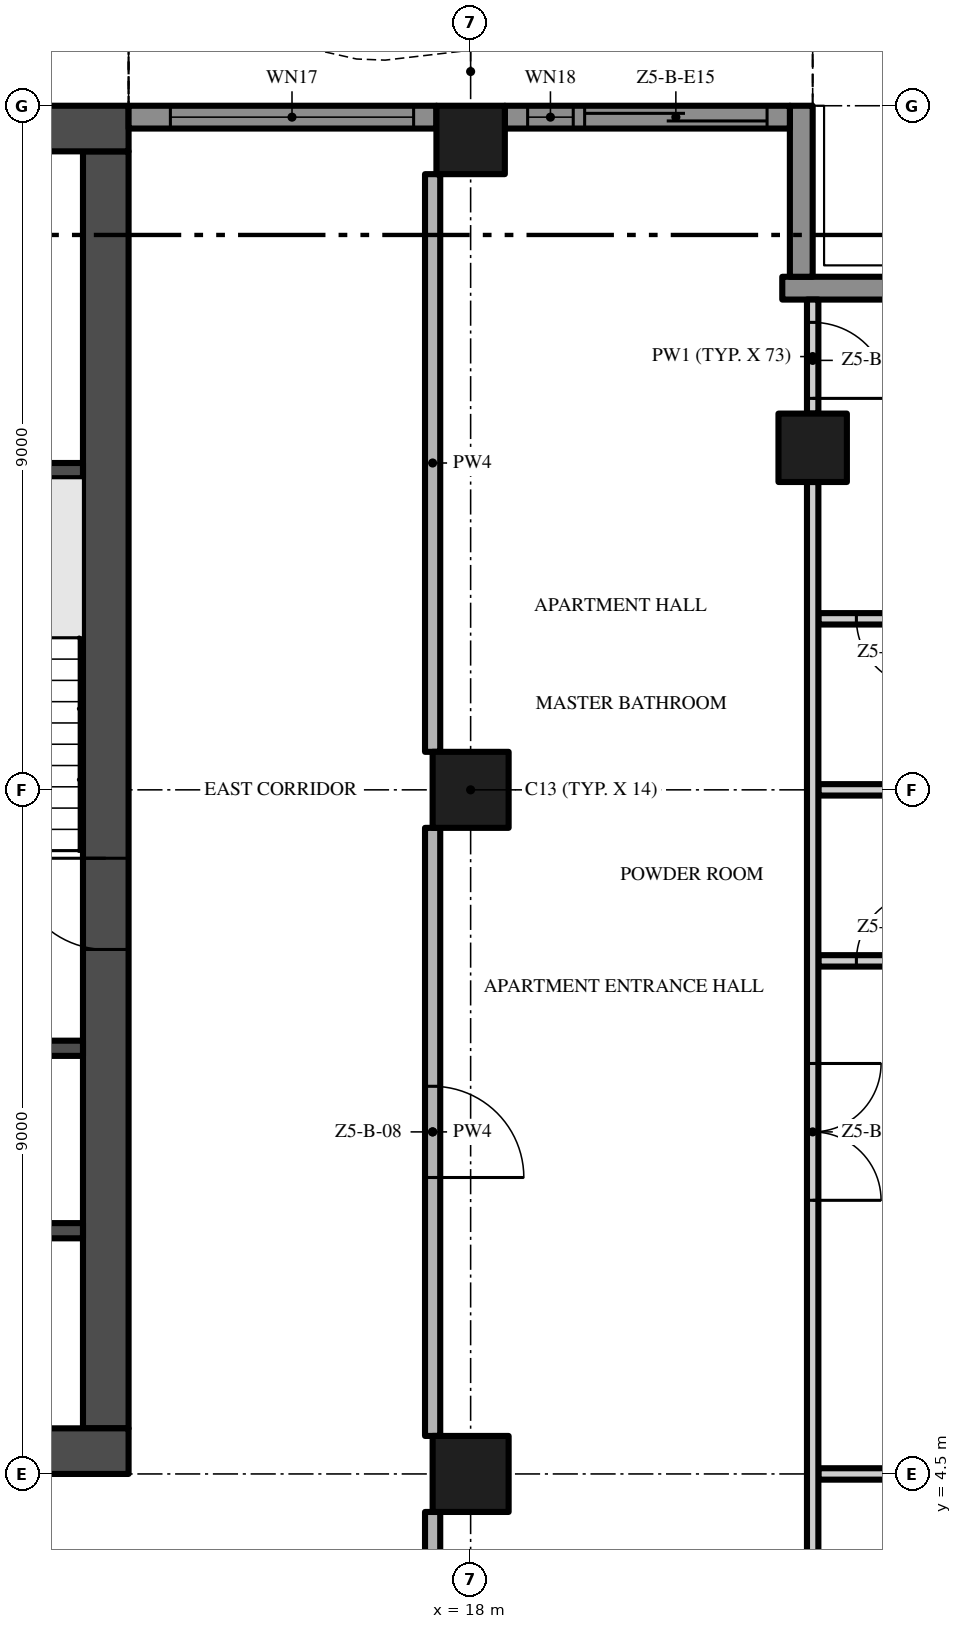
"""IFC4 building model, lengths in metres.
Left out: names, types, materials, properties, quantities, classifications, styles, units other than length and angle.
Written with IfcOpenShell. Run it as: python <this file> out.ifc"""

import sys

from ifc_helpers import new_model, si_unit, direction, frame, frame_2d, origin, origin_2d, place, context, subcontext, project, spatial, polyline, rectangle, outline, extrude, element, fill, save


model = new_model("IFC4")
c1 = context("Model", 3, precision=1e-05, world=origin(), true_north=direction((0.0, 1.0)))
c2 = subcontext(c1, "Body", "Model", "MODEL_VIEW")
j1 = project(units=[si_unit("LENGTHUNIT", "METRE"), si_unit("PLANEANGLEUNIT", "RADIAN")], contexts=[c1])
p1 = place(None, origin())
s1 = spatial("IfcSite", under=j1, at=p1, CompositionType="ELEMENT")
p2 = place(p1, origin())
s2 = spatial("IfcBuilding", under=s1, at=p2, CompositionType="ELEMENT")
p3 = place(p2, frame((0.0, 0.0, 254.0)))
s3 = spatial("IfcBuildingStorey", under=s2, at=p3, CompositionType="ELEMENT", Elevation=254.0)
p4 = place(p3, frame((-13.5, 4.8, -0.3), z_axis=(0.0, 0.0, 1.0), x_axis=(1.0, 0.0, 0.0)))
e1 = element("IfcWall", 1, at=p4, inside=s3, PredefinedType="SHEAR", context=c2, shape_type="SweptSolid", body=[
    extrude(rectangle(XDim=27.0, YDim=0.6, at=frame_2d((13.5, 0.0))), origin(), (0.0, 0.0, 1.0), 3.8),
])
p5 = place(p4, frame((12.0, 0.0, 0.3)))
e2 = element("IfcOpeningElement", 2, at=p5, cuts=e1, PredefinedType="OPENING", context=c2, shape_type="SweptSolid", body=[
    extrude(rectangle(XDim=3.0, YDim=2.4, at=frame_2d((1.5, 1.2))), frame((0.0, 0.31, 0.0), z_axis=(0.0, -1.0, 0.0), x_axis=(1.0, 0.0, 0.0)), (0.0, 0.0, 1.0), 0.62),
])
p6 = place(p4, frame((4.9, 0.0, 0.3)))
e3 = element("IfcOpeningElement", 3, at=p6, cuts=e1, PredefinedType="OPENING", context=c2, shape_type="SweptSolid", body=[
    extrude(rectangle(XDim=1.2, YDim=2.2, at=frame_2d((0.6, 1.1))), frame((0.0, 0.31, 0.0), z_axis=(0.0, -1.0, 0.0), x_axis=(1.0, 0.0, 0.0)), (0.0, 0.0, 1.0), 0.62),
])
p7 = place(p4, frame((20.75, 0.0, 0.3)))
e4 = element("IfcOpeningElement", 4, at=p7, cuts=e1, PredefinedType="OPENING", context=c2, shape_type="SweptSolid", body=[
    extrude(rectangle(XDim=1.5, YDim=2.2, at=frame_2d((0.75, 1.1))), frame((0.0, 0.31, 0.0), z_axis=(0.0, -1.0, 0.0), x_axis=(1.0, 0.0, 0.0)), (0.0, 0.0, 1.0), 0.62),
])
p8 = place(p4, frame((17.4, 0.0, 0.3)))
e5 = element("IfcOpeningElement", 5, at=p8, cuts=e1, PredefinedType="OPENING", context=c2, shape_type="SweptSolid", body=[
    extrude(rectangle(XDim=1.2, YDim=2.2, at=frame_2d((0.6, 1.1))), frame((0.0, 0.31, 0.0), z_axis=(0.0, -1.0, 0.0), x_axis=(1.0, 0.0, 0.0)), (0.0, 0.0, 1.0), 0.62),
])
p9 = place(p3, frame((13.2, 5.1, -0.3), z_axis=(0.0, 0.0, 1.0), x_axis=(0.0, 1.0, 0.0)))
e6 = element("IfcWall", 6, at=p9, inside=s3, PredefinedType="SHEAR", context=c2, shape_type="SweptSolid", body=[
    extrude(rectangle(XDim=16.8, YDim=0.6, at=frame_2d((8.4, 0.0))), origin(), (0.0, 0.0, 1.0), 3.8),
])
p10 = place(p9, frame((6.3, 0.0, 0.3)))
e7 = element("IfcOpeningElement", 7, at=p10, cuts=e6, PredefinedType="OPENING", context=c2, shape_type="SweptSolid", body=[
    extrude(rectangle(XDim=1.2, YDim=2.2, at=frame_2d((0.6, 1.1))), frame((0.0, 0.31, 0.0), z_axis=(0.0, -1.0, 0.0), x_axis=(1.0, 0.0, 0.0)), (0.0, 0.0, 1.0), 0.62),
])
p11 = place(p3, frame((13.5, 22.2, -0.3), z_axis=(0.0, 0.0, 1.0), x_axis=(-1.0, 0.0, 0.0)))
e8 = element("IfcWall", 8, at=p11, inside=s3, PredefinedType="SHEAR", context=c2, shape_type="SweptSolid", body=[
    extrude(rectangle(XDim=27.0, YDim=0.6, at=frame_2d((13.5, 0.0))), origin(), (0.0, 0.0, 1.0), 3.8),
])
p12 = place(p3, frame((18.0, 13.5, 0.0), z_axis=(0.0, 0.0, 1.0), x_axis=(1.0, 0.0, 0.0)))
e9 = element("IfcColumn", 9, at=p12, inside=s3, PredefinedType="COLUMN", context=c2, shape_type="SweptSolid", body=[
    extrude(rectangle(XDim=1.0, YDim=1.0, at=origin_2d()), origin(), (0.0, 0.0, 1.0), 3.5),
])
p13 = place(p3, frame((18.0, 22.05, 0.0), z_axis=(0.0, 0.0, 1.0), x_axis=(1.0, 0.0, 0.0)))
e10 = element("IfcColumn", 10, at=p13, inside=s3, PredefinedType="COLUMN", context=c2, shape_type="SweptSolid", body=[
    extrude(rectangle(XDim=0.9, YDim=0.9, at=origin_2d()), origin(), (0.0, 0.0, 1.0), 3.5),
])
p14 = place(p3, frame((18.0, 4.5, 0.0), z_axis=(0.0, 0.0, 1.0), x_axis=(1.0, 0.0, 0.0)))
e11 = element("IfcColumn", 11, at=p14, inside=s3, PredefinedType="COLUMN", context=c2, shape_type="SweptSolid", body=[
    extrude(rectangle(XDim=1.0, YDim=1.0, at=origin_2d()), origin(), (0.0, 0.0, 1.0), 3.5),
])
p15 = place(p3, frame((22.5, 18.0, 0.0), z_axis=(0.0, 0.0, 1.0), x_axis=(1.0, 0.0, 0.0)))
e12 = element("IfcColumn", 12, at=p15, inside=s3, PredefinedType="COLUMN", context=c2, shape_type="SweptSolid", body=[
    extrude(rectangle(XDim=0.9, YDim=0.9, at=origin_2d()), origin(), (0.0, 0.0, 1.0), 3.5),
])
p16 = place(p3, frame((22.1, 20.1, 0.0), z_axis=(0.0, 0.0, 1.0), x_axis=(1.0, 0.0, 0.0)))
e13 = element("IfcWall", 13, at=p16, inside=s3, PredefinedType="SOLIDWALL", context=c2, shape_type="SweptSolid", body=[
    extrude(rectangle(XDim=2.35, YDim=0.3, at=frame_2d((1.175, 0.0))), origin(), (0.0, 0.0, 1.0), 3.5),
])
p17 = place(p3, frame((22.35, 22.5, 0.0), z_axis=(0.0, 0.0, 1.0), x_axis=(0.0, -1.0, 0.0)))
e14 = element("IfcWall", 14, at=p17, inside=s3, PredefinedType="SOLIDWALL", context=c2, shape_type="SweptSolid", body=[
    extrude(rectangle(XDim=2.25, YDim=0.3, at=frame_2d((1.125, 0.0))), origin(), (0.0, 0.0, 1.0), 3.5),
])
p18 = place(p3, frame((18.45, 22.35, 0.0), z_axis=(0.0, 0.0, 1.0), x_axis=(1.0, 0.0, 0.0)))
e15 = element("IfcWall", 15, at=p18, inside=s3, PredefinedType="SOLIDWALL", context=c2, shape_type="SweptSolid", body=[
    extrude(rectangle(XDim=3.75, YDim=0.3, at=frame_2d((1.875, 0.0))), origin(), (0.0, 0.0, 1.0), 3.5),
])
p19 = place(p18, frame((1.05, 0.0, 0.0)))
e16 = element("IfcOpeningElement", 16, at=p19, cuts=e15, PredefinedType="OPENING", context=c2, shape_type="SweptSolid", body=[
    extrude(rectangle(XDim=2.4, YDim=2.4, at=frame_2d((1.2, 1.2))), frame((0.0, 0.16, 0.0), z_axis=(0.0, -1.0, 0.0), x_axis=(1.0, 0.0, 0.0)), (0.0, 0.0, 1.0), 0.32),
])
p20 = place(p18, frame((0.3, 0.0, 0.45)))
e17 = element("IfcOpeningElement", 17, at=p20, cuts=e15, PredefinedType="OPENING", context=c2, shape_type="SweptSolid", body=[
    extrude(rectangle(XDim=0.6, YDim=2.65, at=frame_2d((0.3, 1.325))), frame((0.0, 0.16, 0.0), z_axis=(0.0, -1.0, 0.0), x_axis=(1.0, 0.0, 0.0)), (0.0, 0.0, 1.0), 0.32),
])
p21 = place(p3, frame((13.5, 22.35, 0.0), z_axis=(0.0, 0.0, 1.0), x_axis=(1.0, 0.0, 0.0)))
e18 = element("IfcWall", 18, at=p21, inside=s3, PredefinedType="SOLIDWALL", context=c2, shape_type="SweptSolid", body=[
    extrude(rectangle(XDim=4.05, YDim=0.3, at=frame_2d((2.025, 0.0))), origin(), (0.0, 0.0, 1.0), 3.5),
])
p22 = place(p21, frame((0.55, 0.0, 0.45)))
e19 = element("IfcOpeningElement", 19, at=p22, cuts=e18, PredefinedType="OPENING", context=c2, shape_type="SweptSolid", body=[
    extrude(rectangle(XDim=3.2, YDim=2.65, at=frame_2d((1.6, 1.325))), frame((0.0, 0.16, 0.0), z_axis=(0.0, -1.0, 0.0), x_axis=(1.0, 0.0, 0.0)), (0.0, 0.0, 1.0), 0.32),
])
p23 = place(p3, origin())
e20 = element("IfcWall", 20, at=p23, inside=s3, PredefinedType="USERDEFINED", context=c2, shape_type="SweptSolid", body=[
    extrude(outline(polyline([(22.5, 25.149), (21.0, 24.488), (19.5, 23.755), (18.0, 23.231), (16.875, 23.1), (16.5, 23.115), (15.0, 23.451), (13.5, 24.112), (13.399, 23.883), (14.921, 23.213), (16.467, 22.866), (16.885, 22.849), (18.056, 22.986), (19.596, 23.524), (21.105, 24.261), (22.601, 24.92), (22.5, 25.149)])), origin(), (0.0, 0.0, 1.0), 0.9),
])
for number, where, z_axis, x_axis in (
    (21, (9.65, 7.7, 0.0), (0.0, 0.0, 1.0), (1.0, 0.0, 0.0)),
    (22, (9.65, 10.1, 0.0), (0.0, 0.0, 1.0), (1.0, 0.0, 0.0)),
    (23, (9.65, 17.7, 0.0), (0.0, 0.0, 1.0), (1.0, 0.0, 0.0)),
):
    element("IfcWall", number, at=place(p3, frame(where, z_axis=z_axis, x_axis=x_axis)), inside=s3, PredefinedType="SHEAR", context=c2, shape_type="SweptSolid", body=[
        extrude(rectangle(XDim=3.25, YDim=0.2, at=frame_2d((1.625, 0.0))), origin(), (0.0, 0.0, 1.0), 3.5),
    ])
p24 = place(p3, frame((22.575, 4.5, 0.0), z_axis=(0.0, 0.0, 1.0), x_axis=(1.0, 0.0, 0.0)))
e24 = element("IfcWall", 24, at=p24, inside=s3, PredefinedType="PARTITIONING", context=c2, shape_type="SweptSolid", body=[
    extrude(rectangle(XDim=3.525, YDim=0.15, at=frame_2d((1.762, 0.0))), origin(), (0.0, 0.0, 1.0), 3.5),
])
p25 = place(p3, frame((22.575, 11.25, 0.0), z_axis=(0.0, 0.0, 1.0), x_axis=(1.0, 0.0, 0.0)))
e25 = element("IfcWall", 25, at=p25, inside=s3, PredefinedType="PARTITIONING", context=c2, shape_type="SweptSolid", body=[
    extrude(rectangle(XDim=1.875, YDim=0.15, at=frame_2d((0.938, 0.0))), origin(), (0.0, 0.0, 1.0), 3.5),
])
p26 = place(p25, frame((0.5, 0.0, 0.0)))
e26 = element("IfcOpeningElement", 26, at=p26, cuts=e25, PredefinedType="OPENING", context=c2, shape_type="SweptSolid", body=[
    extrude(rectangle(XDim=0.9, YDim=2.1, at=frame_2d((0.45, 1.05))), frame((0.0, 0.085, 0.0), z_axis=(0.0, -1.0, 0.0), x_axis=(1.0, 0.0, 0.0)), (0.0, 0.0, 1.0), 0.17),
])
p27 = place(p3, frame((22.575, 13.5, 0.0), z_axis=(0.0, 0.0, 1.0), x_axis=(1.0, 0.0, 0.0)))
e27 = element("IfcWall", 27, at=p27, inside=s3, PredefinedType="PARTITIONING", context=c2, shape_type="SweptSolid", body=[
    extrude(rectangle(XDim=1.875, YDim=0.15, at=frame_2d((0.938, 0.0))), origin(), (0.0, 0.0, 1.0), 3.5),
])
p28 = place(p3, frame((24.45, 15.75, 0.0), z_axis=(0.0, 0.0, 1.0), x_axis=(-1.0, 0.0, 0.0)))
e28 = element("IfcWall", 28, at=p28, inside=s3, PredefinedType="PARTITIONING", context=c2, shape_type="SweptSolid", body=[
    extrude(rectangle(XDim=1.875, YDim=0.15, at=frame_2d((0.938, 0.0))), origin(), (0.0, 0.0, 1.0), 3.5),
])
p29 = place(p28, frame((0.475, 0.0, 0.0)))
e29 = element("IfcOpeningElement", 29, at=p29, cuts=e28, PredefinedType="OPENING", context=c2, shape_type="SweptSolid", body=[
    extrude(rectangle(XDim=0.9, YDim=2.1, at=frame_2d((0.45, 1.05))), frame((0.0, 0.085, 0.0), z_axis=(0.0, -1.0, 0.0), x_axis=(1.0, 0.0, 0.0)), (0.0, 0.0, 1.0), 0.17),
])
p30 = place(p3, frame((17.5, -0.2, 0.0), z_axis=(0.0, 0.0, 1.0), x_axis=(0.0, 1.0, 0.0)))
e30 = element("IfcWall", 30, at=p30, inside=s3, PredefinedType="PARTITIONING", context=c2, shape_type="SweptSolid", body=[
    extrude(rectangle(XDim=4.2, YDim=0.2, at=frame_2d((2.1, 0.0))), origin(), (0.0, 0.0, 1.0), 3.5),
])
p31 = place(p3, frame((17.5, 13.0, 0.0), z_axis=(0.0, 0.0, 1.0), x_axis=(0.0, -1.0, 0.0)))
e31 = element("IfcWall", 31, at=p31, inside=s3, PredefinedType="PARTITIONING", context=c2, shape_type="SweptSolid", body=[
    extrude(rectangle(XDim=8.0, YDim=0.2, at=frame_2d((4.0, 0.0))), origin(), (0.0, 0.0, 1.0), 3.5),
])
p32 = place(p31, frame((3.4, 0.0, 0.0)))
e32 = element("IfcOpeningElement", 32, at=p32, cuts=e31, PredefinedType="OPENING", context=c2, shape_type="SweptSolid", body=[
    extrude(rectangle(XDim=1.2, YDim=2.4, at=frame_2d((0.6, 1.2))), frame((0.0, 0.11, 0.0), z_axis=(0.0, -1.0, 0.0), x_axis=(1.0, 0.0, 0.0)), (0.0, 0.0, 1.0), 0.22),
])
p33 = place(p3, frame((17.5, 14.0, 0.0), z_axis=(0.0, 0.0, 1.0), x_axis=(0.0, 1.0, 0.0)))
e33 = element("IfcWall", 33, at=p33, inside=s3, PredefinedType="PARTITIONING", context=c2, shape_type="SweptSolid", body=[
    extrude(rectangle(XDim=7.6, YDim=0.2, at=frame_2d((3.8, 0.0))), origin(), (0.0, 0.0, 1.0), 3.5),
])
p34 = place(p3, frame((22.5, 17.55, 0.0), z_axis=(0.0, 0.0, 1.0), x_axis=(0.0, -1.0, 0.0)))
e34 = element("IfcWall", 34, at=p34, inside=s3, PredefinedType="PARTITIONING", context=c2, shape_type="SweptSolid", body=[
    extrude(rectangle(XDim=17.45, YDim=0.15, at=frame_2d((8.725, 0.0))), origin(), (0.0, 0.0, 1.0), 3.5),
])
p35 = place(p34, frame((14.8, 0.0, 0.0)))
e35 = element("IfcOpeningElement", 35, at=p35, cuts=e34, PredefinedType="OPENING", context=c2, shape_type="SweptSolid", body=[
    extrude(rectangle(XDim=1.0, YDim=2.4, at=frame_2d((0.5, 1.2))), frame((0.0, 0.085, 0.0), z_axis=(0.0, -1.0, 0.0), x_axis=(1.0, 0.0, 0.0)), (0.0, 0.0, 1.0), 0.17),
])
p36 = place(p34, frame((7.65, 0.0, 0.0)))
e36 = element("IfcOpeningElement", 36, at=p36, cuts=e34, PredefinedType="OPENING", context=c2, shape_type="SweptSolid", body=[
    extrude(rectangle(XDim=1.8, YDim=2.4, at=frame_2d((0.9, 1.2))), frame((0.0, 0.085, 0.0), z_axis=(0.0, -1.0, 0.0), x_axis=(1.0, 0.0, 0.0)), (0.0, 0.0, 1.0), 0.17),
])
p37 = place(p3, frame((22.5, 19.95, 0.0), z_axis=(0.0, 0.0, 1.0), x_axis=(0.0, -1.0, 0.0)))
e37 = element("IfcWall", 37, at=p37, inside=s3, PredefinedType="PARTITIONING", context=c2, shape_type="SweptSolid", body=[
    extrude(rectangle(XDim=1.5, YDim=0.15, at=frame_2d((0.75, 0.0))), origin(), (0.0, 0.0, 1.0), 3.5),
])
p38 = place(p37, frame((0.3, 0.0, 0.0)))
e38 = element("IfcOpeningElement", 38, at=p38, cuts=e37, PredefinedType="OPENING", context=c2, shape_type="SweptSolid", body=[
    extrude(rectangle(XDim=1.0, YDim=2.4, at=frame_2d((0.5, 1.2))), frame((0.0, 0.085, 0.0), z_axis=(0.0, -1.0, 0.0), x_axis=(1.0, 0.0, 0.0)), (0.0, 0.0, 1.0), 0.17),
])
p39 = place(p19, origin())
e39 = element("IfcDoor", 39, at=p39, inside=s3, OperationType="SINGLE_SWING_LEFT", PredefinedType="DOOR", context=c2, shape_type="SweptSolid", body=[
    extrude(rectangle(XDim=2.4, YDim=2.4, at=frame_2d((1.2, 1.2))), frame((0.0, 0.025, 0.0), z_axis=(0.0, -1.0, 0.0), x_axis=(1.0, 0.0, 0.0)), (0.0, 0.0, 1.0), 0.05),
])
fill(e16, e39)
p40 = place(p20, origin())
e40 = element("IfcWindow", 40, at=p40, inside=s3, PartitioningType="SINGLE_PANEL", PredefinedType="WINDOW", context=c2, shape_type="SweptSolid", body=[
    extrude(rectangle(XDim=0.6, YDim=2.65, at=frame_2d((0.3, 1.325))), frame((0.0, 0.03, 0.0), z_axis=(0.0, -1.0, 0.0), x_axis=(1.0, 0.0, 0.0)), (0.0, 0.0, 1.0), 0.06),
])
fill(e17, e40)
p41 = place(p22, origin())
e41 = element("IfcWindow", 41, at=p41, inside=s3, PartitioningType="SINGLE_PANEL", PredefinedType="WINDOW", context=c2, shape_type="SweptSolid", body=[
    extrude(rectangle(XDim=3.2, YDim=2.65, at=frame_2d((1.6, 1.325))), frame((0.0, 0.03, 0.0), z_axis=(0.0, -1.0, 0.0), x_axis=(1.0, 0.0, 0.0)), (0.0, 0.0, 1.0), 0.06),
])
fill(e19, e41)
p42 = place(p10, frame((1.2, 0.0, 0.0), z_axis=(0.0, 0.0, 1.0), x_axis=(-1.0, 0.0, 0.0)))
e42 = element("IfcDoor", 42, at=p42, inside=s3, OperationType="SINGLE_SWING_LEFT", PredefinedType="DOOR", context=c2, shape_type="SweptSolid", body=[
    extrude(rectangle(XDim=1.2, YDim=2.2, at=frame_2d((0.6, 1.1))), frame((0.0, 0.025, 0.0), z_axis=(0.0, -1.0, 0.0), x_axis=(1.0, 0.0, 0.0)), (0.0, 0.0, 1.0), 0.05),
])
fill(e7, e42)
p43 = place(p32, origin())
e43 = element("IfcDoor", 43, at=p43, inside=s3, OperationType="SINGLE_SWING_RIGHT", PredefinedType="DOOR", context=c2, shape_type="SweptSolid", body=[
    extrude(rectangle(XDim=1.2, YDim=2.4, at=frame_2d((0.6, 1.2))), frame((0.0, 0.025, 0.0), z_axis=(0.0, -1.0, 0.0), x_axis=(1.0, 0.0, 0.0)), (0.0, 0.0, 1.0), 0.05),
])
fill(e32, e43)
p44 = place(p36, origin())
e44 = element("IfcDoor", 44, at=p44, inside=s3, OperationType="DOUBLE_DOOR_SINGLE_SWING", PredefinedType="DOOR", context=c2, shape_type="SweptSolid", body=[
    extrude(rectangle(XDim=1.8, YDim=2.4, at=frame_2d((0.9, 1.2))), frame((0.0, 0.025, 0.0), z_axis=(0.0, -1.0, 0.0), x_axis=(1.0, 0.0, 0.0)), (0.0, 0.0, 1.0), 0.05),
])
fill(e36, e44)
p45 = place(p26, origin())
e45 = element("IfcDoor", 45, at=p45, inside=s3, OperationType="SINGLE_SWING_RIGHT", PredefinedType="DOOR", context=c2, shape_type="SweptSolid", body=[
    extrude(rectangle(XDim=0.9, YDim=2.1, at=frame_2d((0.45, 1.05))), frame((0.0, 0.025, 0.0), z_axis=(0.0, -1.0, 0.0), x_axis=(1.0, 0.0, 0.0)), (0.0, 0.0, 1.0), 0.05),
])
fill(e26, e45)
p46 = place(p38, origin())
e46 = element("IfcDoor", 46, at=p46, inside=s3, OperationType="SINGLE_SWING_RIGHT", PredefinedType="DOOR", context=c2, shape_type="SweptSolid", body=[
    extrude(rectangle(XDim=1.0, YDim=2.4, at=frame_2d((0.5, 1.2))), frame((0.0, 0.025, 0.0), z_axis=(0.0, -1.0, 0.0), x_axis=(1.0, 0.0, 0.0)), (0.0, 0.0, 1.0), 0.05),
])
fill(e38, e46)
p47 = place(p29, origin())
e47 = element("IfcDoor", 47, at=p47, inside=s3, OperationType="SINGLE_SWING_LEFT", PredefinedType="DOOR", context=c2, shape_type="SweptSolid", body=[
    extrude(rectangle(XDim=0.9, YDim=2.1, at=frame_2d((0.45, 1.05))), frame((0.0, 0.025, 0.0), z_axis=(0.0, -1.0, 0.0), x_axis=(1.0, 0.0, 0.0)), (0.0, 0.0, 1.0), 0.05),
])
fill(e29, e47)
save(model, sys.argv[1])
